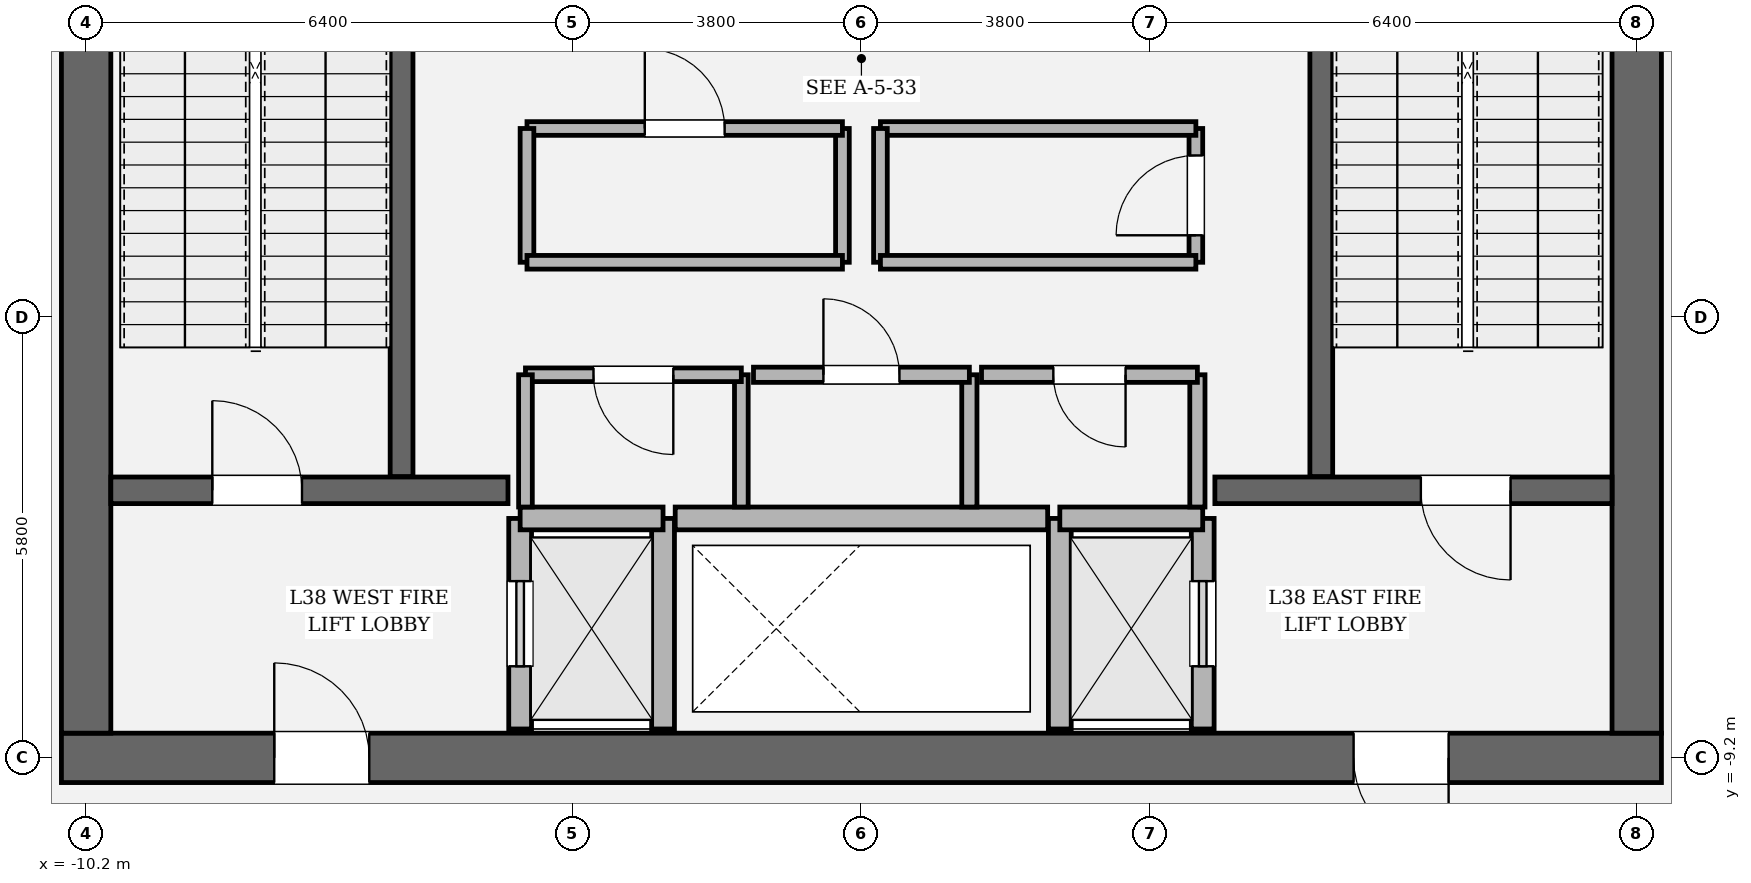
"""IFC4 building model, lengths in metres.
Left out: names, types, materials, properties, quantities, classifications, styles, units other than length and angle.
Written with IfcOpenShell. Run it as: python <this file> out.ifc"""

import sys

from ifc_helpers import new_model, si_unit, direction, frame, frame_2d, origin, place, context, subcontext, project, spatial, rectangle, extrude, element, fill, save


model = new_model("IFC4")
c1 = context("Model", 3, precision=1e-05, world=origin(), true_north=direction((0.0, 1.0)))
c2 = subcontext(c1, "Body", "Model", "MODEL_VIEW")
j1 = project(units=[si_unit("LENGTHUNIT", "METRE"), si_unit("PLANEANGLEUNIT", "RADIAN")], contexts=[c1])
p1 = place(None, origin())
s1 = spatial("IfcSite", under=j1, at=p1, CompositionType="ELEMENT")
p2 = place(p1, origin())
s2 = spatial("IfcBuilding", under=s1, at=p2, CompositionType="ELEMENT")
p3 = place(p2, frame((0.0, 0.0, 164.1)))
s3 = spatial("IfcBuildingStorey", under=s2, at=p3, CompositionType="ELEMENT", Elevation=164.1)
p4 = place(p3, frame((10.525, -9.2, 0.0), z_axis=(0.0, 0.0, 1.0), x_axis=(-1.0, 0.0, 0.0)))
e1 = element("IfcWall", 1, at=p4, inside=s3, PredefinedType="SHEAR", context=c2, shape_type="SweptSolid", body=[
    extrude(rectangle(XDim=21.05, YDim=0.65, at=frame_2d((10.525, 0.0))), origin(), (0.0, 0.0, 1.0), 4.05),
])
p5 = place(p4, frame((2.8, 0.0, 0.0)))
e2 = element("IfcOpeningElement", 2, at=p5, cuts=e1, PredefinedType="OPENING", context=c2, shape_type="SweptSolid", body=[
    extrude(rectangle(XDim=1.25, YDim=2.25, at=frame_2d((0.625, 1.125))), frame((0.0, 0.335, 0.0), z_axis=(0.0, -1.0, 0.0), x_axis=(1.0, 0.0, 0.0)), (0.0, 0.0, 1.0), 0.67),
])
p6 = place(p4, frame((17.0, 0.0, 0.0)))
e3 = element("IfcOpeningElement", 3, at=p6, cuts=e1, PredefinedType="OPENING", context=c2, shape_type="SweptSolid", body=[
    extrude(rectangle(XDim=1.25, YDim=2.25, at=frame_2d((0.625, 1.125))), frame((0.0, 0.335, 0.0), z_axis=(0.0, -1.0, 0.0), x_axis=(1.0, 0.0, 0.0)), (0.0, 0.0, 1.0), 0.67),
])
p7 = place(p3, frame((-10.2, -8.875, 0.0), z_axis=(0.0, 0.0, 1.0), x_axis=(0.0, 1.0, 0.0)))
e4 = element("IfcWall", 4, at=p7, inside=s3, PredefinedType="SHEAR", context=c2, shape_type="SweptSolid", body=[
    extrude(rectangle(XDim=17.75, YDim=0.65, at=frame_2d((8.875, 0.0))), origin(), (0.0, 0.0, 1.0), 4.05),
])
p8 = place(p7, frame((12.665, 0.0, 0.0)))
e5 = element("IfcOpeningElement", 5, at=p8, cuts=e4, PredefinedType="OPENING", context=c2, shape_type="SweptSolid", body=[
    extrude(rectangle(XDim=1.18, YDim=2.2, at=frame_2d((0.59, 1.1))), frame((0.0, 0.335, 0.0), z_axis=(0.0, -1.0, 0.0), x_axis=(1.0, 0.0, 0.0)), (0.0, 0.0, 1.0), 0.67),
])
p9 = place(p3, frame((10.2, 8.875, 0.0), z_axis=(0.0, 0.0, 1.0), x_axis=(0.0, -1.0, 0.0)))
e6 = element("IfcWall", 6, at=p9, inside=s3, PredefinedType="SHEAR", context=c2, shape_type="SweptSolid", body=[
    extrude(rectangle(XDim=17.75, YDim=0.65, at=frame_2d((8.875, 0.0))), origin(), (0.0, 0.0, 1.0), 4.05),
])
p10 = place(p9, frame((3.905, 0.0, 0.0)))
e7 = element("IfcOpeningElement", 7, at=p10, cuts=e6, PredefinedType="OPENING", context=c2, shape_type="SweptSolid", body=[
    extrude(rectangle(XDim=1.18, YDim=2.2, at=frame_2d((0.59, 1.1))), frame((0.0, 0.335, 0.0), z_axis=(0.0, -1.0, 0.0), x_axis=(1.0, 0.0, 0.0)), (0.0, 0.0, 1.0), 0.67),
])
for number, where, z_axis, x_axis in (
    (8, (-6.05, -5.5, 0.0), (0.0, 0.0, 1.0), (0.0, 1.0, 0.0)),
    (9, (6.05, 3.45, 0.0), (0.0, 0.0, 1.0), (0.0, -1.0, 0.0)),
):
    element("IfcWall", number, at=place(p3, frame(where, z_axis=z_axis, x_axis=x_axis)), inside=s3, PredefinedType="SOLIDWALL", context=c2, shape_type="SweptSolid", body=[
        extrude(rectangle(XDim=8.95, YDim=0.3, at=frame_2d((4.475, 0.0))), origin(), (0.0, 0.0, 1.0), 4.05),
    ])
p11 = place(p3, frame((-9.875, -5.68, 0.0), z_axis=(0.0, 0.0, 1.0), x_axis=(1.0, 0.0, 0.0)))
e10 = element("IfcWall", 10, at=p11, inside=s3, PredefinedType="SOLIDWALL", context=c2, shape_type="SweptSolid", body=[
    extrude(rectangle(XDim=5.225, YDim=0.35, at=frame_2d((2.613, 0.0))), origin(), (0.0, 0.0, 1.0), 4.05),
])
p12 = place(p11, frame((1.335, 0.0, 0.0)))
e11 = element("IfcOpeningElement", 11, at=p12, cuts=e10, PredefinedType="OPENING", context=c2, shape_type="SweptSolid", body=[
    extrude(rectangle(XDim=1.18, YDim=2.2, at=frame_2d((0.59, 1.1))), frame((0.0, 0.185, 0.0), z_axis=(0.0, -1.0, 0.0), x_axis=(1.0, 0.0, 0.0)), (0.0, 0.0, 1.0), 0.37),
])
p13 = place(p3, frame((4.65, -5.68, 0.0), z_axis=(0.0, 0.0, 1.0), x_axis=(1.0, 0.0, 0.0)))
e12 = element("IfcWall", 12, at=p13, inside=s3, PredefinedType="SOLIDWALL", context=c2, shape_type="SweptSolid", body=[
    extrude(rectangle(XDim=5.225, YDim=0.35, at=frame_2d((2.613, 0.0))), origin(), (0.0, 0.0, 1.0), 4.05),
])
p14 = place(p13, frame((2.71, 0.0, 0.0)))
e13 = element("IfcOpeningElement", 13, at=p14, cuts=e12, PredefinedType="OPENING", context=c2, shape_type="SweptSolid", body=[
    extrude(rectangle(XDim=1.18, YDim=2.2, at=frame_2d((0.59, 1.1))), frame((0.0, 0.185, 0.0), z_axis=(0.0, -1.0, 0.0), x_axis=(1.0, 0.0, 0.0)), (0.0, 0.0, 1.0), 0.37),
])
p15 = place(p3, frame((-4.49, -8.82, 0.0), z_axis=(0.0, 0.0, 1.0), x_axis=(0.0, 1.0, 0.0)))
e14 = element("IfcWall", 14, at=p15, inside=s3, PredefinedType="SOLIDWALL", context=c2, shape_type="SweptSolid", body=[
    extrude(rectangle(XDim=2.77, YDim=0.3, at=frame_2d((1.385, 0.0))), origin(), (0.0, 0.0, 1.0), 3.83),
])
p16 = place(p15, frame((0.825, 0.0, 0.0)))
e15 = element("IfcOpeningElement", 15, at=p16, cuts=e14, PredefinedType="OPENING", context=c2, shape_type="SweptSolid", body=[
    extrude(rectangle(XDim=1.12, YDim=2.25, at=frame_2d((0.56, 1.125))), frame((0.0, 0.16, 0.0), z_axis=(0.0, -1.0, 0.0), x_axis=(1.0, 0.0, 0.0)), (0.0, 0.0, 1.0), 0.32),
])
p17 = place(p3, frame((-2.61, -8.82, 0.0), z_axis=(0.0, 0.0, 1.0), x_axis=(0.0, 1.0, 0.0)))
e16 = element("IfcWall", 16, at=p17, inside=s3, PredefinedType="SOLIDWALL", context=c2, shape_type="SweptSolid", body=[
    extrude(rectangle(XDim=2.77, YDim=0.3, at=frame_2d((1.385, 0.0))), origin(), (0.0, 0.0, 1.0), 3.83),
])
p18 = place(p3, frame((-4.49, -6.05, 0.0), z_axis=(0.0, 0.0, 1.0), x_axis=(1.0, 0.0, 0.0)))
e17 = element("IfcWall", 17, at=p18, inside=s3, PredefinedType="SOLIDWALL", context=c2, shape_type="SweptSolid", body=[
    extrude(rectangle(XDim=1.88, YDim=0.3, at=frame_2d((0.94, 0.0))), origin(), (0.0, 0.0, 1.0), 3.83),
])
p19 = place(p3, frame((4.49, -8.82, 0.0), z_axis=(0.0, 0.0, 1.0), x_axis=(0.0, 1.0, 0.0)))
e18 = element("IfcWall", 18, at=p19, inside=s3, PredefinedType="SOLIDWALL", context=c2, shape_type="SweptSolid", body=[
    extrude(rectangle(XDim=2.77, YDim=0.3, at=frame_2d((1.385, 0.0))), origin(), (0.0, 0.0, 1.0), 3.83),
])
p20 = place(p19, frame((0.825, 0.0, 0.0)))
e19 = element("IfcOpeningElement", 19, at=p20, cuts=e18, PredefinedType="OPENING", context=c2, shape_type="SweptSolid", body=[
    extrude(rectangle(XDim=1.12, YDim=2.25, at=frame_2d((0.56, 1.125))), frame((0.0, 0.16, 0.0), z_axis=(0.0, -1.0, 0.0), x_axis=(1.0, 0.0, 0.0)), (0.0, 0.0, 1.0), 0.32),
])
p21 = place(p3, frame((2.61, -8.82, 0.0), z_axis=(0.0, 0.0, 1.0), x_axis=(0.0, 1.0, 0.0)))
e20 = element("IfcWall", 20, at=p21, inside=s3, PredefinedType="SOLIDWALL", context=c2, shape_type="SweptSolid", body=[
    extrude(rectangle(XDim=2.77, YDim=0.3, at=frame_2d((1.385, 0.0))), origin(), (0.0, 0.0, 1.0), 3.83),
])
p22 = place(p3, frame((2.61, -6.05, 0.0), z_axis=(0.0, 0.0, 1.0), x_axis=(1.0, 0.0, 0.0)))
e21 = element("IfcWall", 21, at=p22, inside=s3, PredefinedType="SOLIDWALL", context=c2, shape_type="SweptSolid", body=[
    extrude(rectangle(XDim=1.88, YDim=0.3, at=frame_2d((0.94, 0.0))), origin(), (0.0, 0.0, 1.0), 3.83),
])
p23 = place(p3, frame((-2.45, -6.05, 0.0), z_axis=(0.0, 0.0, 1.0), x_axis=(1.0, 0.0, 0.0)))
e22 = element("IfcWall", 22, at=p23, inside=s3, PredefinedType="SOLIDWALL", context=c2, shape_type="SweptSolid", body=[
    extrude(rectangle(XDim=4.9, YDim=0.3, at=frame_2d((2.45, 0.0))), origin(), (0.0, 0.0, 1.0), 3.83),
])
p24 = place(p3, frame((-1.58, -5.9, 0.0), z_axis=(0.0, 0.0, 1.0), x_axis=(0.0, 1.0, 0.0)))
e23 = element("IfcWall", 23, at=p24, inside=s3, PredefinedType="PARTITIONING", context=c2, shape_type="SweptSolid", body=[
    extrude(rectangle(XDim=1.74, YDim=0.18, at=frame_2d((0.87, 0.0))), origin(), (0.0, 0.0, 1.0), 3.83),
])
p25 = place(p3, frame((-1.58, -4.16, 0.0), z_axis=(0.0, 0.0, 1.0), x_axis=(-1.0, 0.0, 0.0)))
e24 = element("IfcWall", 24, at=p25, inside=s3, PredefinedType="PARTITIONING", context=c2, shape_type="SweptSolid", body=[
    extrude(rectangle(XDim=2.84, YDim=0.18, at=frame_2d((1.42, 0.0))), origin(), (0.0, 0.0, 1.0), 3.83),
])
p26 = place(p25, frame((0.895, 0.0, 0.0)))
e25 = element("IfcOpeningElement", 25, at=p26, cuts=e24, PredefinedType="OPENING", context=c2, shape_type="SweptSolid", body=[
    extrude(rectangle(XDim=1.05, YDim=2.2, at=frame_2d((0.525, 1.1))), frame((0.0, 0.1, 0.0), z_axis=(0.0, -1.0, 0.0), x_axis=(1.0, 0.0, 0.0)), (0.0, 0.0, 1.0), 0.2),
])
p27 = place(p3, frame((-4.42, -4.16, 0.0), z_axis=(0.0, 0.0, 1.0), x_axis=(0.0, -1.0, 0.0)))
e26 = element("IfcWall", 26, at=p27, inside=s3, PredefinedType="PARTITIONING", context=c2, shape_type="SweptSolid", body=[
    extrude(rectangle(XDim=1.74, YDim=0.18, at=frame_2d((0.87, 0.0))), origin(), (0.0, 0.0, 1.0), 3.83),
])
p28 = place(p3, frame((1.42, -5.9, 0.0), z_axis=(0.0, 0.0, 1.0), x_axis=(0.0, 1.0, 0.0)))
e27 = element("IfcWall", 27, at=p28, inside=s3, PredefinedType="SOLIDWALL", context=c2, shape_type="SweptSolid", body=[
    extrude(rectangle(XDim=1.74, YDim=0.2, at=frame_2d((0.87, 0.0))), origin(), (0.0, 0.0, 1.0), 3.83),
])
p29 = place(p3, frame((1.42, -4.16, 0.0), z_axis=(0.0, 0.0, 1.0), x_axis=(-1.0, 0.0, 0.0)))
e28 = element("IfcWall", 28, at=p29, inside=s3, PredefinedType="SOLIDWALL", context=c2, shape_type="SweptSolid", body=[
    extrude(rectangle(XDim=2.84, YDim=0.2, at=frame_2d((1.42, 0.0))), origin(), (0.0, 0.0, 1.0), 3.83),
])
p30 = place(p29, frame((0.92, 0.0, 0.0)))
e29 = element("IfcOpeningElement", 29, at=p30, cuts=e28, PredefinedType="OPENING", context=c2, shape_type="SweptSolid", body=[
    extrude(rectangle(XDim=1.0, YDim=2.15, at=frame_2d((0.5, 1.075))), frame((0.0, 0.11, 0.0), z_axis=(0.0, -1.0, 0.0), x_axis=(1.0, 0.0, 0.0)), (0.0, 0.0, 1.0), 0.22),
])
p31 = place(p3, frame((4.42, -5.9, 0.0), z_axis=(0.0, 0.0, 1.0), x_axis=(0.0, 1.0, 0.0)))
e30 = element("IfcWall", 30, at=p31, inside=s3, PredefinedType="SOLIDWALL", context=c2, shape_type="SweptSolid", body=[
    extrude(rectangle(XDim=1.74, YDim=0.2, at=frame_2d((0.87, 0.0))), origin(), (0.0, 0.0, 1.0), 3.83),
])
p32 = place(p3, frame((4.42, -4.16, 0.0), z_axis=(0.0, 0.0, 1.0), x_axis=(-1.0, 0.0, 0.0)))
e31 = element("IfcWall", 31, at=p32, inside=s3, PredefinedType="SOLIDWALL", context=c2, shape_type="SweptSolid", body=[
    extrude(rectangle(XDim=2.84, YDim=0.2, at=frame_2d((1.42, 0.0))), origin(), (0.0, 0.0, 1.0), 3.83),
])
p33 = place(p32, frame((0.945, 0.0, 0.0)))
e32 = element("IfcOpeningElement", 32, at=p33, cuts=e31, PredefinedType="OPENING", context=c2, shape_type="SweptSolid", body=[
    extrude(rectangle(XDim=0.95, YDim=2.15, at=frame_2d((0.475, 1.075))), frame((0.0, 0.11, 0.0), z_axis=(0.0, -1.0, 0.0), x_axis=(1.0, 0.0, 0.0)), (0.0, 0.0, 1.0), 0.22),
])
p34 = place(p3, frame((-0.25, -2.68, 0.0), z_axis=(0.0, 0.0, 1.0), x_axis=(0.0, 1.0, 0.0)))
e33 = element("IfcWall", 33, at=p34, inside=s3, PredefinedType="PARTITIONING", context=c2, shape_type="SweptSolid", body=[
    extrude(rectangle(XDim=1.76, YDim=0.18, at=frame_2d((0.88, 0.0))), origin(), (0.0, 0.0, 1.0), 3.83),
])
p35 = place(p3, frame((-0.25, -0.92, 0.0), z_axis=(0.0, 0.0, 1.0), x_axis=(-1.0, 0.0, 0.0)))
e34 = element("IfcWall", 34, at=p35, inside=s3, PredefinedType="PARTITIONING", context=c2, shape_type="SweptSolid", body=[
    extrude(rectangle(XDim=4.15, YDim=0.18, at=frame_2d((2.075, 0.0))), origin(), (0.0, 0.0, 1.0), 3.83),
])
p36 = place(p35, frame((1.55, 0.0, 0.0)))
e35 = element("IfcOpeningElement", 35, at=p36, cuts=e34, PredefinedType="OPENING", context=c2, shape_type="SweptSolid", body=[
    extrude(rectangle(XDim=1.05, YDim=2.2, at=frame_2d((0.525, 1.1))), frame((0.0, 0.1, 0.0), z_axis=(0.0, -1.0, 0.0), x_axis=(1.0, 0.0, 0.0)), (0.0, 0.0, 1.0), 0.2),
])
p37 = place(p3, frame((-4.4, -0.92, 0.0), z_axis=(0.0, 0.0, 1.0), x_axis=(0.0, -1.0, 0.0)))
e36 = element("IfcWall", 36, at=p37, inside=s3, PredefinedType="PARTITIONING", context=c2, shape_type="SweptSolid", body=[
    extrude(rectangle(XDim=1.76, YDim=0.18, at=frame_2d((0.88, 0.0))), origin(), (0.0, 0.0, 1.0), 3.83),
])
p38 = place(p3, frame((-4.4, -2.68, 0.0), z_axis=(0.0, 0.0, 1.0), x_axis=(1.0, 0.0, 0.0)))
e37 = element("IfcWall", 37, at=p38, inside=s3, PredefinedType="PARTITIONING", context=c2, shape_type="SweptSolid", body=[
    extrude(rectangle(XDim=4.15, YDim=0.18, at=frame_2d((2.075, 0.0))), origin(), (0.0, 0.0, 1.0), 3.83),
])
p39 = place(p3, frame((4.4, -2.68, 0.0), z_axis=(0.0, 0.0, 1.0), x_axis=(0.0, 1.0, 0.0)))
e38 = element("IfcWall", 38, at=p39, inside=s3, PredefinedType="PARTITIONING", context=c2, shape_type="SweptSolid", body=[
    extrude(rectangle(XDim=1.76, YDim=0.18, at=frame_2d((0.88, 0.0))), origin(), (0.0, 0.0, 1.0), 3.83),
])
p40 = place(p39, frame((0.355, 0.0, 0.0)))
e39 = element("IfcOpeningElement", 39, at=p40, cuts=e38, PredefinedType="OPENING", context=c2, shape_type="SweptSolid", body=[
    extrude(rectangle(XDim=1.05, YDim=2.2, at=frame_2d((0.525, 1.1))), frame((0.0, 0.1, 0.0), z_axis=(0.0, -1.0, 0.0), x_axis=(1.0, 0.0, 0.0)), (0.0, 0.0, 1.0), 0.2),
])
p41 = place(p3, frame((4.4, -0.92, 0.0), z_axis=(0.0, 0.0, 1.0), x_axis=(-1.0, 0.0, 0.0)))
e40 = element("IfcWall", 40, at=p41, inside=s3, PredefinedType="PARTITIONING", context=c2, shape_type="SweptSolid", body=[
    extrude(rectangle(XDim=4.15, YDim=0.18, at=frame_2d((2.075, 0.0))), origin(), (0.0, 0.0, 1.0), 3.83),
])
p42 = place(p3, frame((0.25, -0.92, 0.0), z_axis=(0.0, 0.0, 1.0), x_axis=(0.0, -1.0, 0.0)))
e41 = element("IfcWall", 41, at=p42, inside=s3, PredefinedType="PARTITIONING", context=c2, shape_type="SweptSolid", body=[
    extrude(rectangle(XDim=1.76, YDim=0.18, at=frame_2d((0.88, 0.0))), origin(), (0.0, 0.0, 1.0), 3.83),
])
p43 = place(p3, frame((0.25, -2.68, 0.0), z_axis=(0.0, 0.0, 1.0), x_axis=(1.0, 0.0, 0.0)))
e42 = element("IfcWall", 42, at=p43, inside=s3, PredefinedType="PARTITIONING", context=c2, shape_type="SweptSolid", body=[
    extrude(rectangle(XDim=4.15, YDim=0.18, at=frame_2d((2.075, 0.0))), origin(), (0.0, 0.0, 1.0), 3.83),
])
p44 = place(p12, origin())
e43 = element("IfcDoor", 43, at=p44, inside=s3, OperationType="SINGLE_SWING_LEFT", PredefinedType="DOOR", context=c2, shape_type="SweptSolid", body=[
    extrude(rectangle(XDim=1.18, YDim=2.2, at=frame_2d((0.59, 1.1))), frame((0.0, 0.025, 0.0), z_axis=(0.0, -1.0, 0.0), x_axis=(1.0, 0.0, 0.0)), (0.0, 0.0, 1.0), 0.05),
])
fill(e11, e43)
p45 = place(p14, origin())
e44 = element("IfcDoor", 44, at=p45, inside=s3, OperationType="SINGLE_SWING_RIGHT", PredefinedType="DOOR", context=c2, shape_type="SweptSolid", body=[
    extrude(rectangle(XDim=1.18, YDim=2.2, at=frame_2d((0.59, 1.1))), frame((0.0, 0.025, 0.0), z_axis=(0.0, -1.0, 0.0), x_axis=(1.0, 0.0, 0.0)), (0.0, 0.0, 1.0), 0.05),
])
fill(e13, e44)
p46 = place(p5, origin())
e45 = element("IfcDoor", 45, at=p46, inside=s3, OperationType="SINGLE_SWING_LEFT", PredefinedType="DOOR", context=c2, shape_type="SweptSolid", body=[
    extrude(rectangle(XDim=1.25, YDim=2.25, at=frame_2d((0.625, 1.125))), frame((0.0, 0.025, 0.0), z_axis=(0.0, -1.0, 0.0), x_axis=(1.0, 0.0, 0.0)), (0.0, 0.0, 1.0), 0.05),
])
fill(e2, e45)
p47 = place(p6, origin())
e46 = element("IfcDoor", 46, at=p47, inside=s3, OperationType="SINGLE_SWING_RIGHT", PredefinedType="DOOR", context=c2, shape_type="SweptSolid", body=[
    extrude(rectangle(XDim=1.25, YDim=2.25, at=frame_2d((0.625, 1.125))), frame((0.0, 0.025, 0.0), z_axis=(0.0, -1.0, 0.0), x_axis=(1.0, 0.0, 0.0)), (0.0, 0.0, 1.0), 0.05),
])
fill(e3, e46)
p48 = place(p16, origin())
e47 = element("IfcDoor", 47, at=p48, inside=s3, OperationType="SLIDING_TO_LEFT", PredefinedType="DOOR", context=c2, shape_type="SweptSolid", body=[
    extrude(rectangle(XDim=1.12, YDim=2.25, at=frame_2d((0.56, 1.125))), frame((0.0, 0.025, 0.0), z_axis=(0.0, -1.0, 0.0), x_axis=(1.0, 0.0, 0.0)), (0.0, 0.0, 1.0), 0.05),
])
fill(e15, e47)
p49 = place(p20, origin())
e48 = element("IfcDoor", 48, at=p49, inside=s3, OperationType="SLIDING_TO_RIGHT", PredefinedType="DOOR", context=c2, shape_type="SweptSolid", body=[
    extrude(rectangle(XDim=1.12, YDim=2.25, at=frame_2d((0.56, 1.125))), frame((0.0, 0.025, 0.0), z_axis=(0.0, -1.0, 0.0), x_axis=(1.0, 0.0, 0.0)), (0.0, 0.0, 1.0), 0.05),
])
fill(e19, e48)
p50 = place(p26, origin())
e49 = element("IfcDoor", 49, at=p50, inside=s3, OperationType="SINGLE_SWING_LEFT", PredefinedType="DOOR", context=c2, shape_type="SweptSolid", body=[
    extrude(rectangle(XDim=1.05, YDim=2.2, at=frame_2d((0.525, 1.1))), frame((0.0, 0.025, 0.0), z_axis=(0.0, -1.0, 0.0), x_axis=(1.0, 0.0, 0.0)), (0.0, 0.0, 1.0), 0.05),
])
fill(e25, e49)
p51 = place(p30, origin())
e50 = element("IfcDoor", 50, at=p51, inside=s3, OperationType="SINGLE_SWING_RIGHT", PredefinedType="DOOR", context=c2, shape_type="SweptSolid", body=[
    extrude(rectangle(XDim=1.0, YDim=2.15, at=frame_2d((0.5, 1.075))), frame((0.0, 0.025, 0.0), z_axis=(0.0, -1.0, 0.0), x_axis=(1.0, 0.0, 0.0)), (0.0, 0.0, 1.0), 0.05),
])
fill(e29, e50)
p52 = place(p33, origin())
e51 = element("IfcDoor", 51, at=p52, inside=s3, OperationType="SINGLE_SWING_LEFT", PredefinedType="DOOR", context=c2, shape_type="SweptSolid", body=[
    extrude(rectangle(XDim=0.95, YDim=2.15, at=frame_2d((0.475, 1.075))), frame((0.0, 0.025, 0.0), z_axis=(0.0, -1.0, 0.0), x_axis=(1.0, 0.0, 0.0)), (0.0, 0.0, 1.0), 0.05),
])
fill(e32, e51)
p53 = place(p36, origin())
e52 = element("IfcDoor", 52, at=p53, inside=s3, OperationType="SINGLE_SWING_RIGHT", PredefinedType="DOOR", context=c2, shape_type="SweptSolid", body=[
    extrude(rectangle(XDim=1.05, YDim=2.2, at=frame_2d((0.525, 1.1))), frame((0.0, 0.025, 0.0), z_axis=(0.0, -1.0, 0.0), x_axis=(1.0, 0.0, 0.0)), (0.0, 0.0, 1.0), 0.05),
])
fill(e35, e52)
p54 = place(p40, origin())
e53 = element("IfcDoor", 53, at=p54, inside=s3, OperationType="SINGLE_SWING_LEFT", PredefinedType="DOOR", context=c2, shape_type="SweptSolid", body=[
    extrude(rectangle(XDim=1.05, YDim=2.2, at=frame_2d((0.525, 1.1))), frame((0.0, 0.025, 0.0), z_axis=(0.0, -1.0, 0.0), x_axis=(1.0, 0.0, 0.0)), (0.0, 0.0, 1.0), 0.05),
])
fill(e39, e53)
save(model, sys.argv[1])
